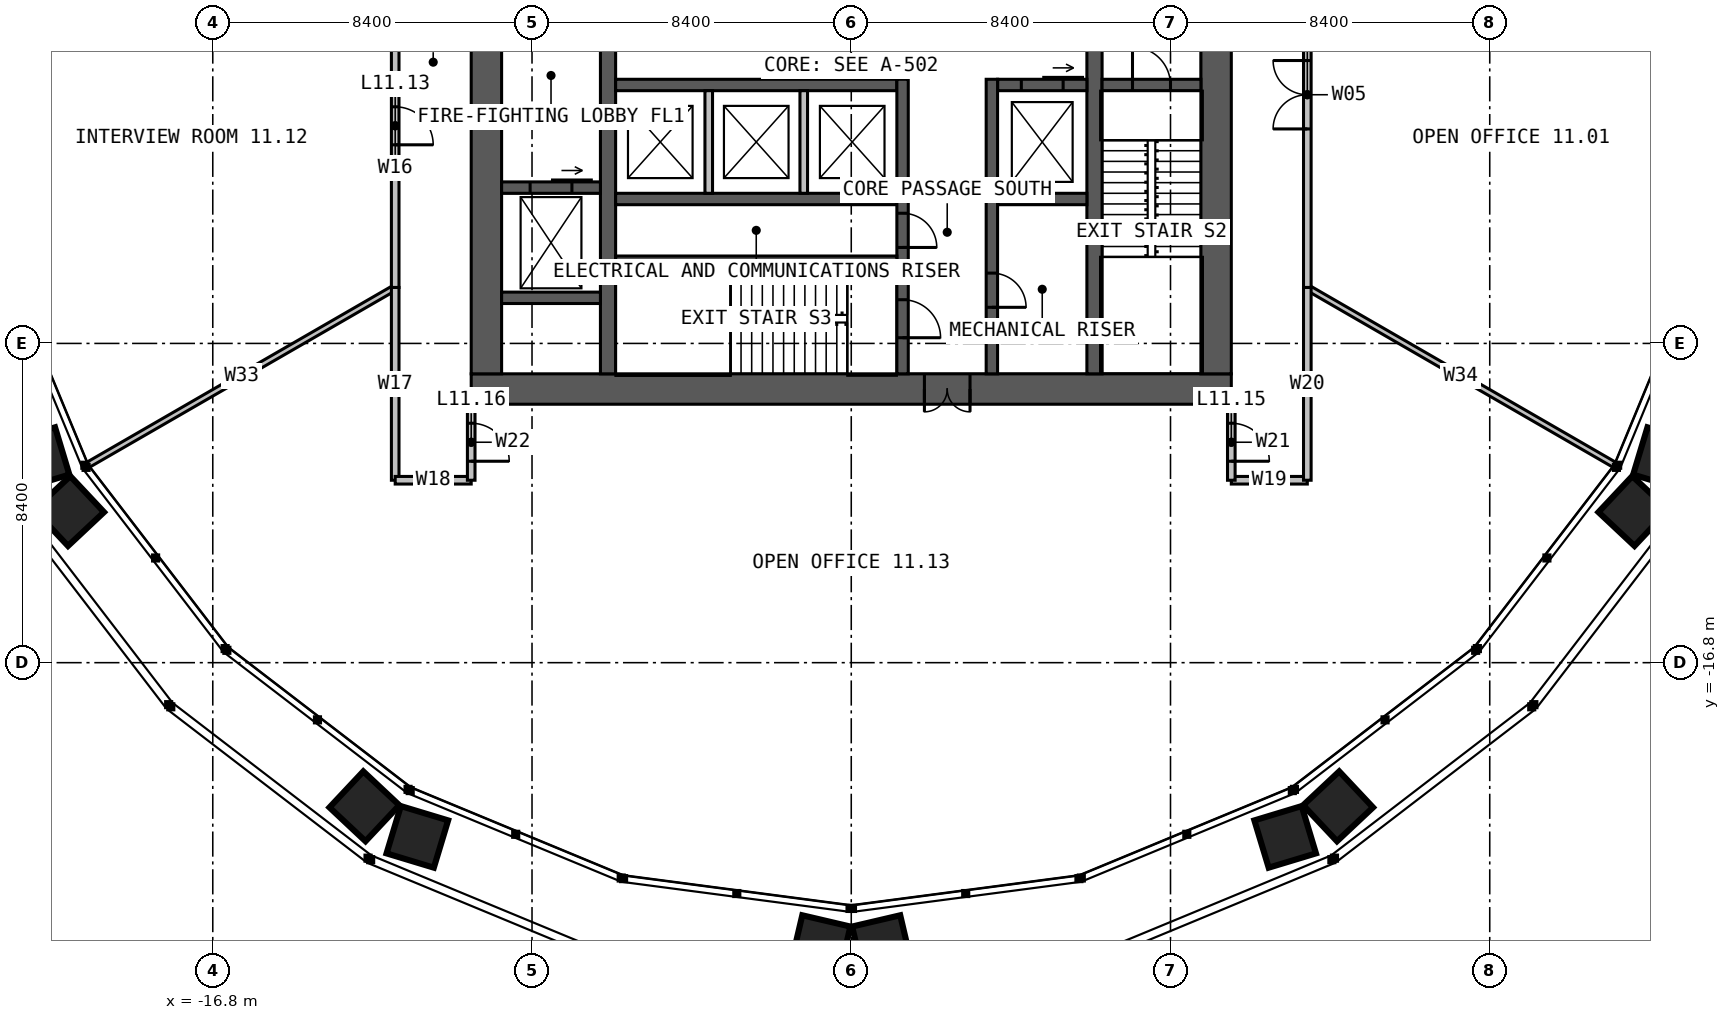
"""IFC4 building model, lengths in metres.
Left out: names, types, materials, properties, quantities, classifications, styles, units other than length and angle.
Written with IfcOpenShell. Run it as: python <this file> out.ifc"""

import sys

from ifc_helpers import new_model, si_unit, direction, frame, frame_2d, origin, place, context, subcontext, project, spatial, rectangle, extrude, element, fill, save


model = new_model("IFC4")
c1 = context("Model", 3, precision=1e-05, world=origin(), true_north=direction((0.0, 1.0)))
c2 = subcontext(c1, "Body", "Model", "MODEL_VIEW")
j1 = project(units=[si_unit("LENGTHUNIT", "METRE"), si_unit("PLANEANGLEUNIT", "RADIAN")], contexts=[c1])
p1 = place(None, origin())
s1 = spatial("IfcSite", under=j1, at=p1, CompositionType="ELEMENT")
p2 = place(p1, origin())
s2 = spatial("IfcBuilding", under=s1, at=p2, CompositionType="ELEMENT")
p3 = place(p2, frame((0.0, 0.0, 49.0)))
s3 = spatial("IfcBuildingStorey", under=s2, at=p3, CompositionType="ELEMENT", Elevation=49.0)
p4 = place(p3, frame((10.0, -9.6, 0.0), z_axis=(0.0, 0.0, 1.0), x_axis=(-1.0, 0.0, 0.0)))
e1 = element("IfcWall", 1, at=p4, inside=s3, PredefinedType="SOLIDWALL", context=c2, shape_type="SweptSolid", body=[
    extrude(rectangle(XDim=20.0, YDim=0.8, at=frame_2d((10.0, 0.0))), origin(), (0.0, 0.0, 1.0), 4.0),
])
p5 = place(p4, frame((6.875, 0.0, 0.0)))
e2 = element("IfcOpeningElement", 2, at=p5, cuts=e1, PredefinedType="OPENING", context=c2, shape_type="SweptSolid", body=[
    extrude(rectangle(XDim=1.2, YDim=2.2, at=frame_2d((0.6, 1.1))), frame((0.0, 0.41, 0.0), z_axis=(0.0, -1.0, 0.0), x_axis=(1.0, 0.0, 0.0)), (0.0, 0.0, 1.0), 0.82),
])
for number, where, z_axis, x_axis in (
    (3, (9.6, -9.2, 0.0), (0.0, 0.0, 1.0), (0.0, 1.0, 0.0)),
    (4, (-9.6, 9.2, 0.0), (0.0, 0.0, 1.0), (0.0, -1.0, 0.0)),
):
    element("IfcWall", number, at=place(p3, frame(where, z_axis=z_axis, x_axis=x_axis)), inside=s3, PredefinedType="SOLIDWALL", context=c2, shape_type="SweptSolid", body=[
        extrude(rectangle(XDim=18.4, YDim=0.8, at=frame_2d((9.2, 0.0))), origin(), (0.0, 0.0, 1.0), 4.0),
    ])
p6 = place(p3, frame((-6.4, -9.2, 0.0), z_axis=(0.0, 0.0, 1.0), x_axis=(0.0, 1.0, 0.0)))
e5 = element("IfcWall", 5, at=p6, inside=s3, PredefinedType="SOLIDWALL", context=c2, shape_type="SweptSolid", body=[
    extrude(rectangle(XDim=18.4, YDim=0.4, at=frame_2d((9.2, 0.0))), origin(), (0.0, 0.0, 1.0), 4.0),
])
p7 = place(p6, frame((8.7, 0.0, 0.0)))
e6 = element("IfcOpeningElement", 6, at=p7, cuts=e5, PredefinedType="OPENING", context=c2, shape_type="SweptSolid", body=[
    extrude(rectangle(XDim=1.0, YDim=2.2, at=frame_2d((0.5, 1.1))), frame((0.0, 0.21, 0.0), z_axis=(0.0, -1.0, 0.0), x_axis=(1.0, 0.0, 0.0)), (0.0, 0.0, 1.0), 0.42),
])
p8 = place(p3, frame((6.4, 9.2, 0.0), z_axis=(0.0, 0.0, 1.0), x_axis=(0.0, -1.0, 0.0)))
e7 = element("IfcWall", 7, at=p8, inside=s3, PredefinedType="SOLIDWALL", context=c2, shape_type="SweptSolid", body=[
    extrude(rectangle(XDim=18.4, YDim=0.4, at=frame_2d((9.2, 0.0))), origin(), (0.0, 0.0, 1.0), 4.0),
])
p9 = place(p8, frame((8.7, 0.0, 0.0)))
e8 = element("IfcOpeningElement", 8, at=p9, cuts=e7, PredefinedType="OPENING", context=c2, shape_type="SweptSolid", body=[
    extrude(rectangle(XDim=1.0, YDim=2.2, at=frame_2d((0.5, 1.1))), frame((0.0, 0.21, 0.0), z_axis=(0.0, -1.0, 0.0), x_axis=(1.0, 0.0, 0.0)), (0.0, 0.0, 1.0), 0.42),
])
p10 = place(p3, frame((-6.2, -1.6, 0.0), z_axis=(0.0, 0.0, 1.0), x_axis=(1.0, 0.0, 0.0)))
e9 = element("IfcWall", 9, at=p10, inside=s3, PredefinedType="SOLIDWALL", context=c2, shape_type="SweptSolid", body=[
    extrude(rectangle(XDim=7.4, YDim=0.3, at=frame_2d((3.7, 0.0))), origin(), (0.0, 0.0, 1.0), 4.0),
])
p11 = place(p3, frame((3.85, -1.6, 0.0), z_axis=(0.0, 0.0, 1.0), x_axis=(1.0, 0.0, 0.0)))
e10 = element("IfcWall", 10, at=p11, inside=s3, PredefinedType="SOLIDWALL", context=c2, shape_type="SweptSolid", body=[
    extrude(rectangle(XDim=2.35, YDim=0.3, at=frame_2d((1.175, 0.0))), origin(), (0.0, 0.0, 1.0), 4.0),
])
p12 = place(p11, frame((0.625, 0.0, 0.0)))
e11 = element("IfcOpeningElement", 11, at=p12, cuts=e10, PredefinedType="OPENING", context=c2, shape_type="SweptSolid", body=[
    extrude(rectangle(XDim=1.1, YDim=2.2, at=frame_2d((0.55, 1.1))), frame((0.0, 0.16, 0.0), z_axis=(0.0, -1.0, 0.0), x_axis=(1.0, 0.0, 0.0)), (0.0, 0.0, 1.0), 0.32),
])
p13 = place(p3, frame((-6.2, -4.6, 0.0), z_axis=(0.0, 0.0, 1.0), x_axis=(1.0, 0.0, 0.0)))
e12 = element("IfcWall", 12, at=p13, inside=s3, PredefinedType="SOLIDWALL", context=c2, shape_type="SweptSolid", body=[
    extrude(rectangle(XDim=7.4, YDim=0.3, at=frame_2d((3.7, 0.0))), origin(), (0.0, 0.0, 1.0), 4.0),
])
p14 = place(p3, frame((3.85, -4.6, 0.0), z_axis=(0.0, 0.0, 1.0), x_axis=(1.0, 0.0, 0.0)))
e13 = element("IfcWall", 13, at=p14, inside=s3, PredefinedType="SOLIDWALL", context=c2, shape_type="SweptSolid", body=[
    extrude(rectangle(XDim=2.35, YDim=0.3, at=frame_2d((1.175, 0.0))), origin(), (0.0, 0.0, 1.0), 4.0),
])
p15 = place(p3, frame((1.35, -1.45, 0.0), z_axis=(0.0, 0.0, 1.0), x_axis=(0.0, -1.0, 0.0)))
e14 = element("IfcWall", 14, at=p15, inside=s3, PredefinedType="SOLIDWALL", context=c2, shape_type="SweptSolid", body=[
    extrude(rectangle(XDim=7.75, YDim=0.3, at=frame_2d((3.875, 0.0))), origin(), (0.0, 0.0, 1.0), 4.0),
])
p16 = place(p15, frame((5.8, 0.0, 0.0)))
e15 = element("IfcOpeningElement", 15, at=p16, cuts=e14, PredefinedType="OPENING", context=c2, shape_type="SweptSolid", body=[
    extrude(rectangle(XDim=1.0, YDim=2.2, at=frame_2d((0.5, 1.1))), frame((0.0, 0.16, 0.0), z_axis=(0.0, -1.0, 0.0), x_axis=(1.0, 0.0, 0.0)), (0.0, 0.0, 1.0), 0.32),
])
p17 = place(p15, frame((3.525, 0.0, 0.0)))
e16 = element("IfcOpeningElement", 16, at=p17, cuts=e14, PredefinedType="OPENING", context=c2, shape_type="SweptSolid", body=[
    extrude(rectangle(XDim=0.9, YDim=2.2, at=frame_2d((0.45, 1.1))), frame((0.0, 0.16, 0.0), z_axis=(0.0, -1.0, 0.0), x_axis=(1.0, 0.0, 0.0)), (0.0, 0.0, 1.0), 0.32),
])
p18 = place(p3, frame((3.7, -1.45, 0.0), z_axis=(0.0, 0.0, 1.0), x_axis=(0.0, -1.0, 0.0)))
e17 = element("IfcWall", 17, at=p18, inside=s3, PredefinedType="SOLIDWALL", context=c2, shape_type="SweptSolid", body=[
    extrude(rectangle(XDim=7.75, YDim=0.3, at=frame_2d((3.875, 0.0))), origin(), (0.0, 0.0, 1.0), 4.0),
])
p19 = place(p18, frame((5.1, 0.0, 0.0)))
e18 = element("IfcOpeningElement", 18, at=p19, cuts=e17, PredefinedType="OPENING", context=c2, shape_type="SweptSolid", body=[
    extrude(rectangle(XDim=0.9, YDim=2.2, at=frame_2d((0.45, 1.1))), frame((0.0, 0.16, 0.0), z_axis=(0.0, -1.0, 0.0), x_axis=(1.0, 0.0, 0.0)), (0.0, 0.0, 1.0), 0.32),
])
p20 = place(p3, frame((-6.2, -6.2, 0.0), z_axis=(0.0, 0.0, 1.0), x_axis=(1.0, 0.0, 0.0)))
e19 = element("IfcWall", 19, at=p20, inside=s3, PredefinedType="SOLIDWALL", context=c2, shape_type="SweptSolid", body=[
    extrude(rectangle(XDim=7.4, YDim=0.2, at=frame_2d((3.7, 0.0))), origin(), (0.0, 0.0, 1.0), 4.0),
])
p21 = place(p3, frame((6.6, -1.6, 0.0), z_axis=(0.0, 0.0, 1.0), x_axis=(1.0, 0.0, 0.0)))
e20 = element("IfcWall", 20, at=p21, inside=s3, PredefinedType="SOLIDWALL", context=c2, shape_type="SweptSolid", body=[
    extrude(rectangle(XDim=2.6, YDim=0.3, at=frame_2d((1.3, 0.0))), origin(), (0.0, 0.0, 1.0), 4.0),
])
p22 = place(p21, frame((0.8, 0.0, 0.0)))
e21 = element("IfcOpeningElement", 21, at=p22, cuts=e20, PredefinedType="OPENING", context=c2, shape_type="SweptSolid", body=[
    extrude(rectangle(XDim=1.0, YDim=2.2, at=frame_2d((0.5, 1.1))), frame((0.0, 0.16, 0.0), z_axis=(0.0, -1.0, 0.0), x_axis=(1.0, 0.0, 0.0)), (0.0, 0.0, 1.0), 0.32),
])
p23 = place(p3, frame((-9.2, -4.3, 0.0), z_axis=(0.0, 0.0, 1.0), x_axis=(1.0, 0.0, 0.0)))
e22 = element("IfcWall", 22, at=p23, inside=s3, PredefinedType="SOLIDWALL", context=c2, shape_type="SweptSolid", body=[
    extrude(rectangle(XDim=2.6, YDim=0.3, at=frame_2d((1.3, 0.0))), origin(), (0.0, 0.0, 1.0), 4.0),
])
p24 = place(p23, frame((0.75, 0.0, 0.0)))
e23 = element("IfcOpeningElement", 23, at=p24, cuts=e22, PredefinedType="OPENING", context=c2, shape_type="SweptSolid", body=[
    extrude(rectangle(XDim=1.1, YDim=2.2, at=frame_2d((0.55, 1.1))), frame((0.0, 0.16, 0.0), z_axis=(0.0, -1.0, 0.0), x_axis=(1.0, 0.0, 0.0)), (0.0, 0.0, 1.0), 0.32),
])
p25 = place(p3, frame((-9.2, -7.2, 0.0), z_axis=(0.0, 0.0, 1.0), x_axis=(1.0, 0.0, 0.0)))
e24 = element("IfcWall", 24, at=p25, inside=s3, PredefinedType="SOLIDWALL", context=c2, shape_type="SweptSolid", body=[
    extrude(rectangle(XDim=2.6, YDim=0.3, at=frame_2d((1.3, 0.0))), origin(), (0.0, 0.0, 1.0), 4.0),
])
for number, where, z_axis, x_axis in (
    (25, (-3.75, -1.75, 0.0), (0.0, 0.0, 1.0), (0.0, -1.0, 0.0)),
    (26, (-1.25, -1.75, 0.0), (0.0, 0.0, 1.0), (0.0, -1.0, 0.0)),
):
    element("IfcWall", number, at=place(p3, frame(where, z_axis=z_axis, x_axis=x_axis)), inside=s3, PredefinedType="SOLIDWALL", context=c2, shape_type="SweptSolid", body=[
        extrude(rectangle(XDim=2.7, YDim=0.2, at=frame_2d((1.35, 0.0))), origin(), (0.0, 0.0, 1.0), 3.75),
    ])
for number, where, z_axis, x_axis in (
    (27, (12.0, -6.928, 0.0), (0.0, 0.0, 1.0), (0.866, -0.5, 0.0)),
    (28, (-12.0, -6.928, 0.0), (0.0, 0.0, 1.0), (-0.866, -0.5, 0.0)),
):
    element("IfcWall", number, at=place(p3, frame(where, z_axis=z_axis, x_axis=x_axis)), inside=s3, PredefinedType="PARTITIONING", context=c2, shape_type="SweptSolid", body=[
        extrude(rectangle(XDim=9.324, YDim=0.15, at=frame_2d((4.662, 0.0))), origin(), (0.0, 0.0, 1.0), 2.79),
    ])
p26 = place(p3, frame((12.0, -6.928, 0.0), z_axis=(0.0, 0.0, 1.0), x_axis=(0.0, 1.0, 0.0)))
e29 = element("IfcWall", 29, at=p26, inside=s3, PredefinedType="PARTITIONING", context=c2, shape_type="SweptSolid", body=[
    extrude(rectangle(XDim=10.144, YDim=0.2, at=frame_2d((5.072, 0.0))), origin(), (0.0, 0.0, 1.0), 3.8),
])
p27 = place(p26, frame((4.172, 0.0, 0.0)))
e30 = element("IfcOpeningElement", 30, at=p27, cuts=e29, PredefinedType="OPENING", context=c2, shape_type="SweptSolid", body=[
    extrude(rectangle(XDim=1.8, YDim=2.2, at=frame_2d((0.9, 1.1))), frame((0.0, 0.11, 0.0), z_axis=(0.0, -1.0, 0.0), x_axis=(1.0, 0.0, 0.0)), (0.0, 0.0, 1.0), 0.22),
])
p28 = place(p3, frame((-12.0, 1.58, 0.0), z_axis=(0.0, 0.0, 1.0), x_axis=(0.0, -1.0, 0.0)))
e31 = element("IfcWall", 31, at=p28, inside=s3, PredefinedType="PARTITIONING", context=c2, shape_type="SweptSolid", body=[
    extrude(rectangle(XDim=8.508, YDim=0.2, at=frame_2d((4.254, 0.0))), origin(), (0.0, 0.0, 1.0), 3.8),
])
p29 = place(p28, frame((3.754, 0.0, 0.0)))
e32 = element("IfcOpeningElement", 32, at=p29, cuts=e31, PredefinedType="OPENING", context=c2, shape_type="SweptSolid", body=[
    extrude(rectangle(XDim=1.0, YDim=2.2, at=frame_2d((0.5, 1.1))), frame((0.0, 0.11, 0.0), z_axis=(0.0, -1.0, 0.0), x_axis=(1.0, 0.0, 0.0)), (0.0, 0.0, 1.0), 0.22),
])
p30 = place(p3, frame((-12.0, -6.928, 0.0), z_axis=(0.0, 0.0, 1.0), x_axis=(0.0, -1.0, 0.0)))
e33 = element("IfcWall", 33, at=p30, inside=s3, PredefinedType="PARTITIONING", context=c2, shape_type="SweptSolid", body=[
    extrude(rectangle(XDim=5.072, YDim=0.2, at=frame_2d((2.536, 0.0))), origin(), (0.0, 0.0, 1.0), 3.8),
])
for number, where, z_axis, x_axis in (
    (34, (-12.0, -12.0, 0.0), (0.0, 0.0, 1.0), (1.0, 0.0, 0.0)),
    (35, (10.0, -12.0, 0.0), (0.0, 0.0, 1.0), (1.0, 0.0, 0.0)),
):
    element("IfcWall", number, at=place(p3, frame(where, z_axis=z_axis, x_axis=x_axis)), inside=s3, PredefinedType="PARTITIONING", context=c2, shape_type="SweptSolid", body=[
        extrude(rectangle(XDim=2.0, YDim=0.2, at=frame_2d((1.0, 0.0))), origin(), (0.0, 0.0, 1.0), 3.8),
    ])
p31 = place(p3, frame((12.0, -12.0, 0.0), z_axis=(0.0, 0.0, 1.0), x_axis=(0.0, 1.0, 0.0)))
e36 = element("IfcWall", 36, at=p31, inside=s3, PredefinedType="PARTITIONING", context=c2, shape_type="SweptSolid", body=[
    extrude(rectangle(XDim=5.072, YDim=0.2, at=frame_2d((2.536, 0.0))), origin(), (0.0, 0.0, 1.0), 3.8),
])
p32 = place(p3, frame((10.0, -10.0, 0.0), z_axis=(0.0, 0.0, 1.0), x_axis=(0.0, -1.0, 0.0)))
e37 = element("IfcWall", 37, at=p32, inside=s3, PredefinedType="PARTITIONING", context=c2, shape_type="SweptSolid", body=[
    extrude(rectangle(XDim=2.0, YDim=0.2, at=frame_2d((1.0, 0.0))), origin(), (0.0, 0.0, 1.0), 3.8),
])
p33 = place(p32, frame((0.5, 0.0, 0.0)))
e38 = element("IfcOpeningElement", 38, at=p33, cuts=e37, PredefinedType="OPENING", context=c2, shape_type="SweptSolid", body=[
    extrude(rectangle(XDim=1.0, YDim=2.2, at=frame_2d((0.5, 1.1))), frame((0.0, 0.11, 0.0), z_axis=(0.0, -1.0, 0.0), x_axis=(1.0, 0.0, 0.0)), (0.0, 0.0, 1.0), 0.22),
])
p34 = place(p3, frame((-10.0, -10.0, 0.0), z_axis=(0.0, 0.0, 1.0), x_axis=(0.0, -1.0, 0.0)))
e39 = element("IfcWall", 39, at=p34, inside=s3, PredefinedType="PARTITIONING", context=c2, shape_type="SweptSolid", body=[
    extrude(rectangle(XDim=2.0, YDim=0.2, at=frame_2d((1.0, 0.0))), origin(), (0.0, 0.0, 1.0), 3.8),
])
p35 = place(p34, frame((0.5, 0.0, 0.0)))
e40 = element("IfcOpeningElement", 40, at=p35, cuts=e39, PredefinedType="OPENING", context=c2, shape_type="SweptSolid", body=[
    extrude(rectangle(XDim=1.0, YDim=2.2, at=frame_2d((0.5, 1.1))), frame((0.0, 0.11, 0.0), z_axis=(0.0, -1.0, 0.0), x_axis=(1.0, 0.0, 0.0)), (0.0, 0.0, 1.0), 0.22),
])
p36 = place(p5, origin())
e41 = element("IfcDoor", 41, at=p36, inside=s3, OperationType="DOUBLE_DOOR_SINGLE_SWING", PredefinedType="DOOR", context=c2, shape_type="SweptSolid", body=[
    extrude(rectangle(XDim=1.2, YDim=2.2, at=frame_2d((0.6, 1.1))), frame((0.0, 0.025, 0.0), z_axis=(0.0, -1.0, 0.0), x_axis=(1.0, 0.0, 0.0)), (0.0, 0.0, 1.0), 0.05),
])
fill(e2, e41)
p37 = place(p22, origin())
e42 = element("IfcDoor", 42, at=p37, inside=s3, OperationType="SINGLE_SWING_LEFT", PredefinedType="DOOR", context=c2, shape_type="SweptSolid", body=[
    extrude(rectangle(XDim=1.0, YDim=2.2, at=frame_2d((0.5, 1.1))), frame((0.0, 0.025, 0.0), z_axis=(0.0, -1.0, 0.0), x_axis=(1.0, 0.0, 0.0)), (0.0, 0.0, 1.0), 0.05),
])
fill(e21, e42)
p38 = place(p16, origin())
e43 = element("IfcDoor", 43, at=p38, inside=s3, OperationType="SINGLE_SWING_RIGHT", PredefinedType="DOOR", context=c2, shape_type="SweptSolid", body=[
    extrude(rectangle(XDim=1.0, YDim=2.2, at=frame_2d((0.5, 1.1))), frame((0.0, 0.025, 0.0), z_axis=(0.0, -1.0, 0.0), x_axis=(1.0, 0.0, 0.0)), (0.0, 0.0, 1.0), 0.05),
])
fill(e15, e43)
p39 = place(p17, origin())
e44 = element("IfcDoor", 44, at=p39, inside=s3, OperationType="SINGLE_SWING_RIGHT", PredefinedType="DOOR", context=c2, shape_type="SweptSolid", body=[
    extrude(rectangle(XDim=0.9, YDim=2.2, at=frame_2d((0.45, 1.1))), frame((0.0, 0.025, 0.0), z_axis=(0.0, -1.0, 0.0), x_axis=(1.0, 0.0, 0.0)), (0.0, 0.0, 1.0), 0.05),
])
fill(e16, e44)
p40 = place(p19, origin())
e45 = element("IfcDoor", 45, at=p40, inside=s3, OperationType="SINGLE_SWING_RIGHT", PredefinedType="DOOR", context=c2, shape_type="SweptSolid", body=[
    extrude(rectangle(XDim=0.9, YDim=2.2, at=frame_2d((0.45, 1.1))), frame((0.0, 0.025, 0.0), z_axis=(0.0, -1.0, 0.0), x_axis=(1.0, 0.0, 0.0)), (0.0, 0.0, 1.0), 0.05),
])
fill(e18, e45)
p41 = place(p12, origin())
e46 = element("IfcDoor", 46, at=p41, inside=s3, OperationType="SLIDING_TO_LEFT", PredefinedType="DOOR", context=c2, shape_type="SweptSolid", body=[
    extrude(rectangle(XDim=1.1, YDim=2.2, at=frame_2d((0.55, 1.1))), frame((0.0, 0.025, 0.0), z_axis=(0.0, -1.0, 0.0), x_axis=(1.0, 0.0, 0.0)), (0.0, 0.0, 1.0), 0.05),
])
fill(e11, e46)
p42 = place(p24, origin())
e47 = element("IfcDoor", 47, at=p42, inside=s3, OperationType="SLIDING_TO_LEFT", PredefinedType="DOOR", context=c2, shape_type="SweptSolid", body=[
    extrude(rectangle(XDim=1.1, YDim=2.2, at=frame_2d((0.55, 1.1))), frame((0.0, 0.025, 0.0), z_axis=(0.0, -1.0, 0.0), x_axis=(1.0, 0.0, 0.0)), (0.0, 0.0, 1.0), 0.05),
])
fill(e23, e47)
p43 = place(p27, origin())
e48 = element("IfcDoor", 48, at=p43, inside=s3, OperationType="DOUBLE_DOOR_SINGLE_SWING", PredefinedType="DOOR", context=c2, shape_type="SweptSolid", body=[
    extrude(rectangle(XDim=1.8, YDim=2.2, at=frame_2d((0.9, 1.1))), frame((0.0, 0.025, 0.0), z_axis=(0.0, -1.0, 0.0), x_axis=(1.0, 0.0, 0.0)), (0.0, 0.0, 1.0), 0.05),
])
fill(e30, e48)
p44 = place(p29, origin())
e49 = element("IfcDoor", 49, at=p44, inside=s3, OperationType="SINGLE_SWING_RIGHT", PredefinedType="DOOR", context=c2, shape_type="SweptSolid", body=[
    extrude(rectangle(XDim=1.0, YDim=2.2, at=frame_2d((0.5, 1.1))), frame((0.0, 0.025, 0.0), z_axis=(0.0, -1.0, 0.0), x_axis=(1.0, 0.0, 0.0)), (0.0, 0.0, 1.0), 0.05),
])
fill(e32, e49)
p45 = place(p33, origin())
e50 = element("IfcDoor", 50, at=p45, inside=s3, OperationType="SINGLE_SWING_RIGHT", PredefinedType="DOOR", context=c2, shape_type="SweptSolid", body=[
    extrude(rectangle(XDim=1.0, YDim=2.2, at=frame_2d((0.5, 1.1))), frame((0.0, 0.025, 0.0), z_axis=(0.0, -1.0, 0.0), x_axis=(1.0, 0.0, 0.0)), (0.0, 0.0, 1.0), 0.05),
])
fill(e38, e50)
p46 = place(p35, origin())
e51 = element("IfcDoor", 51, at=p46, inside=s3, OperationType="SINGLE_SWING_RIGHT", PredefinedType="DOOR", context=c2, shape_type="SweptSolid", body=[
    extrude(rectangle(XDim=1.0, YDim=2.2, at=frame_2d((0.5, 1.1))), frame((0.0, 0.025, 0.0), z_axis=(0.0, -1.0, 0.0), x_axis=(1.0, 0.0, 0.0)), (0.0, 0.0, 1.0), 0.05),
])
fill(e40, e51)
save(model, sys.argv[1])
